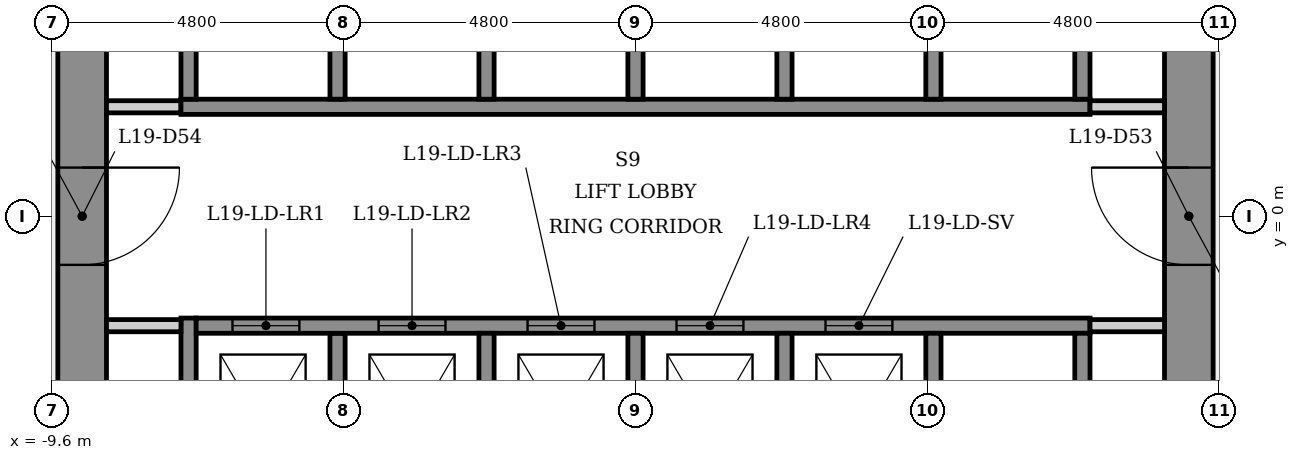
"""IFC4 building model, lengths in metres.
Left out: names, types, materials, properties, quantities, classifications, styles, units other than length and angle.
Written with IfcOpenShell. Run it as: python <this file> out.ifc"""

import sys

from ifc_helpers import new_model, si_unit, direction, frame, frame_2d, origin, place, context, subcontext, project, spatial, rectangle, extrude, element, fill, save


model = new_model("IFC4")
c1 = context("Model", 3, precision=1e-05, world=origin(), true_north=direction((0.0, 1.0)))
c2 = subcontext(c1, "Body", "Model", "MODEL_VIEW")
j1 = project(units=[si_unit("LENGTHUNIT", "METRE"), si_unit("PLANEANGLEUNIT", "RADIAN")], contexts=[c1])
p1 = place(None, origin())
s1 = spatial("IfcSite", under=j1, at=p1, CompositionType="ELEMENT")
p2 = place(p1, origin())
s2 = spatial("IfcBuilding", under=s1, at=p2, CompositionType="ELEMENT")
p3 = place(p2, frame((0.0, 0.0, 74.3)))
s3 = spatial("IfcBuildingStorey", under=s2, at=p3, CompositionType="ELEMENT", Elevation=74.3)
p4 = place(p3, frame((9.1, -5.485, 0.0), z_axis=(0.0, 0.0, 1.0), x_axis=(0.0, 1.0, 0.0)))
e1 = element("IfcWall", 1, at=p4, inside=s3, PredefinedType="SHEAR", context=c2, shape_type="SweptSolid", body=[
    extrude(rectangle(XDim=10.97, YDim=0.8, at=frame_2d((5.485, 0.0))), origin(), (0.0, 0.0, 1.0), 4.0),
])
p5 = place(p4, frame((4.685, 0.0, 0.0)))
e2 = element("IfcOpeningElement", 2, at=p5, cuts=e1, PredefinedType="OPENING", context=c2, shape_type="SweptSolid", body=[
    extrude(rectangle(XDim=1.6, YDim=2.1, at=frame_2d((0.8, 1.05))), frame((0.0, 0.41, 0.0), z_axis=(0.0, -1.0, 0.0), x_axis=(1.0, 0.0, 0.0)), (0.0, 0.0, 1.0), 0.82),
])
p6 = place(p3, frame((-9.1, 5.485, 0.0), z_axis=(0.0, 0.0, 1.0), x_axis=(0.0, -1.0, 0.0)))
e3 = element("IfcWall", 3, at=p6, inside=s3, PredefinedType="SHEAR", context=c2, shape_type="SweptSolid", body=[
    extrude(rectangle(XDim=10.97, YDim=0.8, at=frame_2d((5.485, 0.0))), origin(), (0.0, 0.0, 1.0), 4.0),
])
p7 = place(p6, frame((4.685, 0.0, 0.0)))
e4 = element("IfcOpeningElement", 4, at=p7, cuts=e3, PredefinedType="OPENING", context=c2, shape_type="SweptSolid", body=[
    extrude(rectangle(XDim=1.6, YDim=2.1, at=frame_2d((0.8, 1.05))), frame((0.0, 0.41, 0.0), z_axis=(0.0, -1.0, 0.0), x_axis=(1.0, 0.0, 0.0)), (0.0, 0.0, 1.0), 0.82),
])
p8 = place(p3, frame((-8.7, 1.8, 0.0), z_axis=(0.0, 0.0, 1.0), x_axis=(1.0, 0.0, 0.0)))
e5 = element("IfcWall", 5, at=p8, inside=s3, PredefinedType="PARTITIONING", context=c2, shape_type="SweptSolid", body=[
    extrude(rectangle(XDim=1.225, YDim=0.2, at=frame_2d((0.613, 0.0))), origin(), (0.0, 0.0, 1.0), 3.6),
])
p9 = place(p3, frame((-7.475, 1.8, 0.0), z_axis=(0.0, 0.0, 1.0), x_axis=(1.0, 0.0, 0.0)))
e6 = element("IfcWall", 6, at=p9, inside=s3, PredefinedType="SHEAR", context=c2, shape_type="SweptSolid", body=[
    extrude(rectangle(XDim=14.95, YDim=0.25, at=frame_2d((7.475, 0.0))), origin(), (0.0, 0.0, 1.0), 3.6),
])
p10 = place(p3, frame((-7.35, -5.73, 0.0), z_axis=(0.0, 0.0, 1.0), x_axis=(0.0, 1.0, 0.0)))
e7 = element("IfcWall", 7, at=p10, inside=s3, PredefinedType="SHEAR", context=c2, shape_type="SweptSolid", body=[
    extrude(rectangle(XDim=4.055, YDim=0.25, at=frame_2d((2.028, 0.0))), origin(), (0.0, 0.0, 1.0), 3.6),
])
p11 = place(p3, frame((-7.35, 1.925, 0.0), z_axis=(0.0, 0.0, 1.0), x_axis=(0.0, 1.0, 0.0)))
e8 = element("IfcWall", 8, at=p11, inside=s3, PredefinedType="SHEAR", context=c2, shape_type="SweptSolid", body=[
    extrude(rectangle(XDim=3.805, YDim=0.25, at=frame_2d((1.903, 0.0))), origin(), (0.0, 0.0, 1.0), 3.6),
])
p12 = place(p3, frame((-7.475, -1.8, 0.0), z_axis=(0.0, 0.0, 1.0), x_axis=(-1.0, 0.0, 0.0)))
e9 = element("IfcWall", 9, at=p12, inside=s3, PredefinedType="PARTITIONING", context=c2, shape_type="SweptSolid", body=[
    extrude(rectangle(XDim=1.225, YDim=0.2, at=frame_2d((0.613, 0.0))), origin(), (0.0, 0.0, 1.0), 3.6),
])
for number, where, z_axis, x_axis in (
    (10, (-4.9, -1.925, 0.0), (0.0, 0.0, 1.0), (0.0, -1.0, 0.0)),
    (11, (-4.9, 5.025, 0.0), (0.0, 0.0, 1.0), (0.0, -1.0, 0.0)),
):
    element("IfcWall", number, at=place(p3, frame(where, z_axis=z_axis, x_axis=x_axis)), inside=s3, PredefinedType="SHEAR", context=c2, shape_type="SweptSolid", body=[
        extrude(rectangle(XDim=3.1, YDim=0.25, at=frame_2d((1.55, 0.0))), origin(), (0.0, 0.0, 1.0), 4.0),
    ])
p13 = place(p3, frame((-7.225, -1.8, 0.0), z_axis=(0.0, 0.0, 1.0), x_axis=(1.0, 0.0, 0.0)))
e12 = element("IfcWall", 12, at=p13, inside=s3, PredefinedType="SHEAR", context=c2, shape_type="SweptSolid", body=[
    extrude(rectangle(XDim=14.7, YDim=0.25, at=frame_2d((7.35, 0.0))), origin(), (0.0, 0.0, 1.0), 3.6),
])
p14 = place(p13, frame((0.597, 0.0, 0.0)))
e13 = element("IfcOpeningElement", 13, at=p14, cuts=e12, PredefinedType="OPENING", context=c2, shape_type="SweptSolid", body=[
    extrude(rectangle(XDim=1.1, YDim=2.1, at=frame_2d((0.55, 1.05))), frame((0.0, 0.135, 0.0), z_axis=(0.0, -1.0, 0.0), x_axis=(1.0, 0.0, 0.0)), (0.0, 0.0, 1.0), 0.27),
])
p15 = place(p13, frame((3.0, 0.0, 0.0)))
e14 = element("IfcOpeningElement", 14, at=p15, cuts=e12, PredefinedType="OPENING", context=c2, shape_type="SweptSolid", body=[
    extrude(rectangle(XDim=1.1, YDim=2.1, at=frame_2d((0.55, 1.05))), frame((0.0, 0.135, 0.0), z_axis=(0.0, -1.0, 0.0), x_axis=(1.0, 0.0, 0.0)), (0.0, 0.0, 1.0), 0.27),
])
p16 = place(p13, frame((5.45, 0.0, 0.0)))
e15 = element("IfcOpeningElement", 15, at=p16, cuts=e12, PredefinedType="OPENING", context=c2, shape_type="SweptSolid", body=[
    extrude(rectangle(XDim=1.1, YDim=2.1, at=frame_2d((0.55, 1.05))), frame((0.0, 0.135, 0.0), z_axis=(0.0, -1.0, 0.0), x_axis=(1.0, 0.0, 0.0)), (0.0, 0.0, 1.0), 0.27),
])
p17 = place(p13, frame((7.9, 0.0, 0.0)))
e16 = element("IfcOpeningElement", 16, at=p17, cuts=e12, PredefinedType="OPENING", context=c2, shape_type="SweptSolid", body=[
    extrude(rectangle(XDim=1.1, YDim=2.1, at=frame_2d((0.55, 1.05))), frame((0.0, 0.135, 0.0), z_axis=(0.0, -1.0, 0.0), x_axis=(1.0, 0.0, 0.0)), (0.0, 0.0, 1.0), 0.27),
])
p18 = place(p13, frame((10.35, 0.0, 0.0)))
e17 = element("IfcOpeningElement", 17, at=p18, cuts=e12, PredefinedType="OPENING", context=c2, shape_type="SweptSolid", body=[
    extrude(rectangle(XDim=1.1, YDim=2.1, at=frame_2d((0.55, 1.05))), frame((0.0, 0.135, 0.0), z_axis=(0.0, -1.0, 0.0), x_axis=(1.0, 0.0, 0.0)), (0.0, 0.0, 1.0), 0.27),
])
for number, where, z_axis, x_axis in (
    (18, (-2.45, -1.925, 0.0), (0.0, 0.0, 1.0), (0.0, -1.0, 0.0)),
    (19, (-2.45, 5.025, 0.0), (0.0, 0.0, 1.0), (0.0, -1.0, 0.0)),
    (20, (0.0, -1.925, 0.0), (0.0, 0.0, 1.0), (0.0, -1.0, 0.0)),
    (21, (0.0, 5.025, 0.0), (0.0, 0.0, 1.0), (0.0, -1.0, 0.0)),
    (22, (2.45, -1.925, 0.0), (0.0, 0.0, 1.0), (0.0, -1.0, 0.0)),
    (23, (2.45, 5.025, 0.0), (0.0, 0.0, 1.0), (0.0, -1.0, 0.0)),
    (24, (4.9, -1.925, 0.0), (0.0, 0.0, 1.0), (0.0, -1.0, 0.0)),
    (25, (4.9, 5.025, 0.0), (0.0, 0.0, 1.0), (0.0, -1.0, 0.0)),
):
    element("IfcWall", number, at=place(p3, frame(where, z_axis=z_axis, x_axis=x_axis)), inside=s3, PredefinedType="SHEAR", context=c2, shape_type="SweptSolid", body=[
        extrude(rectangle(XDim=3.1, YDim=0.25, at=frame_2d((1.55, 0.0))), origin(), (0.0, 0.0, 1.0), 4.0),
    ])
p19 = place(p3, frame((7.475, 1.8, 0.0), z_axis=(0.0, 0.0, 1.0), x_axis=(1.0, 0.0, 0.0)))
e26 = element("IfcWall", 26, at=p19, inside=s3, PredefinedType="PARTITIONING", context=c2, shape_type="SweptSolid", body=[
    extrude(rectangle(XDim=1.225, YDim=0.2, at=frame_2d((0.613, 0.0))), origin(), (0.0, 0.0, 1.0), 3.6),
])
for number, where, z_axis, x_axis in (
    (27, (7.35, -1.925, 0.0), (0.0, 0.0, 1.0), (0.0, -1.0, 0.0)),
    (28, (7.35, 5.73, 0.0), (0.0, 0.0, 1.0), (0.0, -1.0, 0.0)),
):
    element("IfcWall", number, at=place(p3, frame(where, z_axis=z_axis, x_axis=x_axis)), inside=s3, PredefinedType="SHEAR", context=c2, shape_type="SweptSolid", body=[
        extrude(rectangle(XDim=3.805, YDim=0.25, at=frame_2d((1.903, 0.0))), origin(), (0.0, 0.0, 1.0), 3.6),
    ])
p20 = place(p3, frame((8.7, -1.8, 0.0), z_axis=(0.0, 0.0, 1.0), x_axis=(-1.0, 0.0, 0.0)))
e29 = element("IfcWall", 29, at=p20, inside=s3, PredefinedType="PARTITIONING", context=c2, shape_type="SweptSolid", body=[
    extrude(rectangle(XDim=1.225, YDim=0.2, at=frame_2d((0.613, 0.0))), origin(), (0.0, 0.0, 1.0), 3.6),
])
p21 = place(p14, origin())
e30 = element("IfcDoor", 30, at=p21, inside=s3, OperationType="SLIDING_TO_LEFT", PredefinedType="DOOR", context=c2, shape_type="SweptSolid", body=[
    extrude(rectangle(XDim=1.1, YDim=2.1, at=frame_2d((0.55, 1.05))), frame((0.0, 0.025, 0.0), z_axis=(0.0, -1.0, 0.0), x_axis=(1.0, 0.0, 0.0)), (0.0, 0.0, 1.0), 0.05),
])
fill(e13, e30)
p22 = place(p15, origin())
e31 = element("IfcDoor", 31, at=p22, inside=s3, OperationType="SLIDING_TO_LEFT", PredefinedType="DOOR", context=c2, shape_type="SweptSolid", body=[
    extrude(rectangle(XDim=1.1, YDim=2.1, at=frame_2d((0.55, 1.05))), frame((0.0, 0.025, 0.0), z_axis=(0.0, -1.0, 0.0), x_axis=(1.0, 0.0, 0.0)), (0.0, 0.0, 1.0), 0.05),
])
fill(e14, e31)
p23 = place(p16, origin())
e32 = element("IfcDoor", 32, at=p23, inside=s3, OperationType="SLIDING_TO_LEFT", PredefinedType="DOOR", context=c2, shape_type="SweptSolid", body=[
    extrude(rectangle(XDim=1.1, YDim=2.1, at=frame_2d((0.55, 1.05))), frame((0.0, 0.025, 0.0), z_axis=(0.0, -1.0, 0.0), x_axis=(1.0, 0.0, 0.0)), (0.0, 0.0, 1.0), 0.05),
])
fill(e15, e32)
p24 = place(p17, origin())
e33 = element("IfcDoor", 33, at=p24, inside=s3, OperationType="SLIDING_TO_LEFT", PredefinedType="DOOR", context=c2, shape_type="SweptSolid", body=[
    extrude(rectangle(XDim=1.1, YDim=2.1, at=frame_2d((0.55, 1.05))), frame((0.0, 0.025, 0.0), z_axis=(0.0, -1.0, 0.0), x_axis=(1.0, 0.0, 0.0)), (0.0, 0.0, 1.0), 0.05),
])
fill(e16, e33)
p25 = place(p18, origin())
e34 = element("IfcDoor", 34, at=p25, inside=s3, OperationType="SLIDING_TO_LEFT", PredefinedType="DOOR", context=c2, shape_type="SweptSolid", body=[
    extrude(rectangle(XDim=1.1, YDim=2.1, at=frame_2d((0.55, 1.05))), frame((0.0, 0.025, 0.0), z_axis=(0.0, -1.0, 0.0), x_axis=(1.0, 0.0, 0.0)), (0.0, 0.0, 1.0), 0.05),
])
fill(e17, e34)
p26 = place(p5, origin())
e35 = element("IfcDoor", 35, at=p26, inside=s3, OperationType="SINGLE_SWING_RIGHT", PredefinedType="DOOR", context=c2, shape_type="SweptSolid", body=[
    extrude(rectangle(XDim=1.6, YDim=2.1, at=frame_2d((0.8, 1.05))), frame((0.0, 0.025, 0.0), z_axis=(0.0, -1.0, 0.0), x_axis=(1.0, 0.0, 0.0)), (0.0, 0.0, 1.0), 0.05),
])
fill(e2, e35)
p27 = place(p7, origin())
e36 = element("IfcDoor", 36, at=p27, inside=s3, OperationType="SINGLE_SWING_LEFT", PredefinedType="DOOR", context=c2, shape_type="SweptSolid", body=[
    extrude(rectangle(XDim=1.6, YDim=2.1, at=frame_2d((0.8, 1.05))), frame((0.0, 0.025, 0.0), z_axis=(0.0, -1.0, 0.0), x_axis=(1.0, 0.0, 0.0)), (0.0, 0.0, 1.0), 0.05),
])
fill(e4, e36)
save(model, sys.argv[1])
